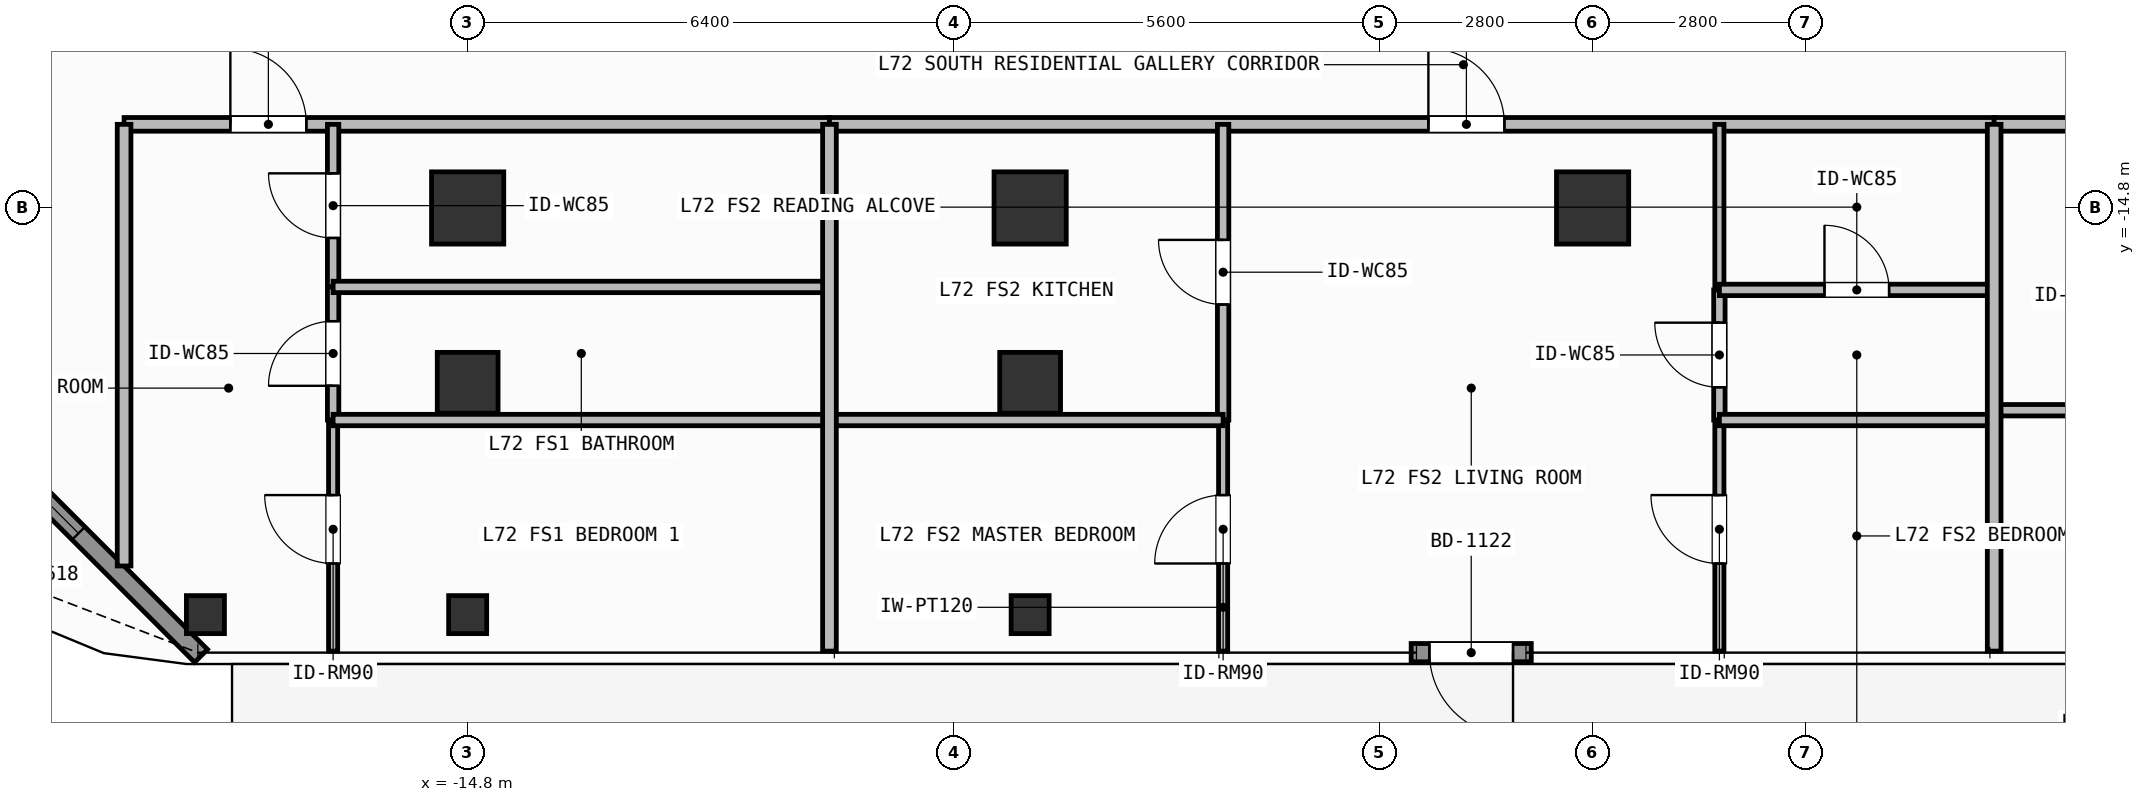
"""IFC4 building model, lengths in metres.
Left out: names, types, materials, properties, quantities, classifications, styles, units other than length and angle.
Written with IfcOpenShell. Run it as: python <this file> out.ifc"""

import sys

from ifc_helpers import new_model, si_unit, direction, frame, frame_2d, origin, origin_2d, place, context, subcontext, project, spatial, rectangle, hollow_rectangle, extrude, element, fill, save


model = new_model("IFC4")
c1 = context("Model", 3, precision=1e-05, world=origin(), true_north=direction((0.0, 1.0)))
c2 = subcontext(c1, "Body", "Model", "MODEL_VIEW")
j1 = project(units=[si_unit("LENGTHUNIT", "METRE"), si_unit("PLANEANGLEUNIT", "RADIAN")], contexts=[c1])
p1 = place(None, origin())
s1 = spatial("IfcSite", under=j1, at=p1, CompositionType="ELEMENT")
p2 = place(p1, origin())
s2 = spatial("IfcBuilding", under=s1, at=p2, CompositionType="ELEMENT")
p3 = place(p2, frame((0.0, 0.0, 293.7)))
s3 = spatial("IfcBuildingStorey", under=s2, at=p3, CompositionType="ELEMENT", Elevation=293.7)
for number, where, z_axis, x_axis in (
    (1, (-14.8, -14.8, 0.0), (0.0, 0.0, 1.0), (1.0, 0.0, 0.0)),
    (2, (-7.4, -14.8, 0.0), (0.0, 0.0, 1.0), (1.0, 0.0, 0.0)),
    (3, (0.0, -14.8, 0.0), (0.0, 0.0, 1.0), (1.0, 0.0, 0.0)),
):
    element("IfcColumn", number, at=place(p3, frame(where, z_axis=z_axis, x_axis=x_axis)), inside=s3, PredefinedType="COLUMN", context=c2, shape_type="SweptSolid", body=[
        extrude(rectangle(XDim=0.95, YDim=0.95, at=origin_2d()), origin(), (0.0, 0.0, 1.0), 3.9),
    ])
for number, where, z_axis, x_axis in (
    (4, (-14.8, -17.1, 0.0), (0.0, 0.0, 1.0), (1.0, 0.0, 0.0)),
    (5, (-7.4, -17.1, 0.0), (0.0, 0.0, 1.0), (1.0, 0.0, 0.0)),
):
    element("IfcColumn", number, at=place(p3, frame(where, z_axis=z_axis, x_axis=x_axis)), inside=s3, PredefinedType="COLUMN", context=c2, shape_type="SweptSolid", body=[
        extrude(hollow_rectangle(XDim=0.8, YDim=0.8, WallThickness=0.036, at=origin_2d()), origin(), (0.0, 0.0, 1.0), 3.9),
    ])
for number, where, z_axis, x_axis in (
    (6, (-18.25, -20.15, 0.0), (0.0, 0.0, 1.0), (1.0, 0.0, 0.0)),
    (7, (-14.8, -20.15, 0.0), (0.0, 0.0, 1.0), (1.0, 0.0, 0.0)),
    (8, (-7.4, -20.15, 0.0), (0.0, 0.0, 1.0), (1.0, 0.0, 0.0)),
):
    element("IfcColumn", number, at=place(p3, frame(where, z_axis=z_axis, x_axis=x_axis)), inside=s3, PredefinedType="COLUMN", context=c2, shape_type="SweptSolid", body=[
        extrude(hollow_rectangle(XDim=0.5, YDim=0.5, WallThickness=0.025, at=origin_2d()), origin(), (0.0, 0.0, 1.0), 3.9),
    ])
p4 = place(p3, frame((-0.807, -20.65, 0.0), z_axis=(0.0, 0.0, 1.0), x_axis=(-1.0, 0.0, 0.0)))
e9 = element("IfcWall", 9, at=p4, inside=s3, PredefinedType="SOLIDWALL", context=c2, shape_type="SweptSolid", body=[
    extrude(rectangle(XDim=1.58, YDim=0.24, at=frame_2d((0.79, 0.0))), origin(), (0.0, 0.0, 1.0), 3.68),
])
p5 = place(p4, frame((0.24, 0.0, 0.0)))
e10 = element("IfcOpeningElement", 10, at=p5, cuts=e9, PredefinedType="OPENING", context=c2, shape_type="SweptSolid", body=[
    extrude(rectangle(XDim=1.1, YDim=2.2, at=frame_2d((0.55, 1.1))), frame((0.0, 0.13, 0.0), z_axis=(0.0, -1.0, 0.0), x_axis=(1.0, 0.0, 0.0)), (0.0, 0.0, 1.0), 0.26),
])
p6 = place(p3, frame((-18.308, -20.692, 0.0), z_axis=(0.0, 0.0, 1.0), x_axis=(-0.707106781187, 0.707106781187, 0.0)))
e11 = element("IfcWall", 11, at=p6, inside=s3, PredefinedType="SOLIDWALL", context=c2, shape_type="SweptSolid", body=[
    extrude(rectangle(XDim=6.059, YDim=0.24, at=frame_2d((3.03, 0.0))), origin(), (0.0, 0.0, 1.0), 3.68),
])
p7 = place(p6, frame((2.28, 0.0, 0.8)))
e12 = element("IfcOpeningElement", 12, at=p7, cuts=e11, PredefinedType="OPENING", context=c2, shape_type="SweptSolid", body=[
    extrude(rectangle(XDim=1.5, YDim=1.85, at=frame_2d((0.75, 0.925))), frame((0.0, 0.13, 0.0), z_axis=(0.0, -1.0, 0.0), x_axis=(1.0, 0.0, 0.0)), (0.0, 0.0, 1.0), 0.26),
])
p8 = place(p3, frame((-19.32, -13.7, 0.0), z_axis=(0.0, 0.0, 1.0), x_axis=(1.0, 0.0, 0.0)))
e13 = element("IfcWall", 13, at=p8, inside=s3, PredefinedType="PARTITIONING", context=c2, shape_type="SweptSolid", body=[
    extrude(rectangle(XDim=9.28, YDim=0.18, at=frame_2d((4.64, 0.0))), origin(), (0.0, 0.0, 1.0), 3.68),
])
p9 = place(p8, frame((1.398, 0.0, 0.0)))
e14 = element("IfcOpeningElement", 14, at=p9, cuts=e13, PredefinedType="OPENING", context=c2, shape_type="SweptSolid", body=[
    extrude(rectangle(XDim=1.0, YDim=2.2, at=frame_2d((0.5, 1.1))), frame((0.0, 0.1, 0.0), z_axis=(0.0, -1.0, 0.0), x_axis=(1.0, 0.0, 0.0)), (0.0, 0.0, 1.0), 0.2),
])
p10 = place(p3, frame((-16.57, -15.839, 0.0), z_axis=(0.0, 0.0, 1.0), x_axis=(0.0, 1.0, 0.0)))
e15 = element("IfcWall", 15, at=p10, inside=s3, PredefinedType="PARTITIONING", context=c2, shape_type="SweptSolid", body=[
    extrude(rectangle(XDim=2.139, YDim=0.15, at=frame_2d((1.07, 0.0))), origin(), (0.0, 0.0, 1.0), 3.68),
])
p11 = place(p10, frame((0.645, 0.0, 0.0)))
e16 = element("IfcOpeningElement", 16, at=p11, cuts=e15, PredefinedType="OPENING", context=c2, shape_type="SweptSolid", body=[
    extrude(rectangle(XDim=0.85, YDim=2.1, at=frame_2d((0.425, 1.05))), frame((0.0, 0.085, 0.0), z_axis=(0.0, -1.0, 0.0), x_axis=(1.0, 0.0, 0.0)), (0.0, 0.0, 1.0), 0.17),
])
p12 = place(p3, frame((-16.57, -17.59, 0.0), z_axis=(0.0, 0.0, 1.0), x_axis=(0.0, 1.0, 0.0)))
e17 = element("IfcWall", 17, at=p12, inside=s3, PredefinedType="PARTITIONING", context=c2, shape_type="SweptSolid", body=[
    extrude(rectangle(XDim=1.751, YDim=0.15, at=frame_2d((0.875, 0.0))), origin(), (0.0, 0.0, 1.0), 3.68),
])
p13 = place(p12, frame((0.45, 0.0, 0.0)))
e18 = element("IfcOpeningElement", 18, at=p13, cuts=e17, PredefinedType="OPENING", context=c2, shape_type="SweptSolid", body=[
    extrude(rectangle(XDim=0.85, YDim=2.1, at=frame_2d((0.425, 1.05))), frame((0.0, 0.085, 0.0), z_axis=(0.0, -1.0, 0.0), x_axis=(1.0, 0.0, 0.0)), (0.0, 0.0, 1.0), 0.17),
])
p14 = place(p3, frame((-16.57, -20.63, 0.0), z_axis=(0.0, 0.0, 1.0), x_axis=(0.0, 1.0, 0.0)))
e19 = element("IfcWall", 19, at=p14, inside=s3, PredefinedType="PARTITIONING", context=c2, shape_type="SweptSolid", body=[
    extrude(rectangle(XDim=3.04, YDim=0.12, at=frame_2d((1.52, 0.0))), origin(), (0.0, 0.0, 1.0), 3.68),
])
p15 = place(p14, frame((1.153, 0.0, 0.0)))
e20 = element("IfcOpeningElement", 20, at=p15, cuts=e19, PredefinedType="OPENING", context=c2, shape_type="SweptSolid", body=[
    extrude(rectangle(XDim=0.9, YDim=2.1, at=frame_2d((0.45, 1.05))), frame((0.0, 0.07, 0.0), z_axis=(0.0, -1.0, 0.0), x_axis=(1.0, 0.0, 0.0)), (0.0, 0.0, 1.0), 0.14),
])
p16 = place(p3, frame((-10.04, -13.7, 0.0), z_axis=(0.0, 0.0, 1.0), x_axis=(1.0, 0.0, 0.0)))
e21 = element("IfcWall", 21, at=p16, inside=s3, PredefinedType="PARTITIONING", context=c2, shape_type="SweptSolid", body=[
    extrude(rectangle(XDim=15.323, YDim=0.18, at=frame_2d((7.662, 0.0))), origin(), (0.0, 0.0, 1.0), 3.68),
])
p17 = place(p16, frame((7.88, 0.0, 0.0)))
e22 = element("IfcOpeningElement", 22, at=p17, cuts=e21, PredefinedType="OPENING", context=c2, shape_type="SweptSolid", body=[
    extrude(rectangle(XDim=1.0, YDim=2.2, at=frame_2d((0.5, 1.1))), frame((0.0, 0.1, 0.0), z_axis=(0.0, -1.0, 0.0), x_axis=(1.0, 0.0, 0.0)), (0.0, 0.0, 1.0), 0.2),
])
p18 = place(p3, frame((-4.861, -17.59, 0.0), z_axis=(0.0, 0.0, 1.0), x_axis=(0.0, 1.0, 0.0)))
e23 = element("IfcWall", 23, at=p18, inside=s3, PredefinedType="PARTITIONING", context=c2, shape_type="SweptSolid", body=[
    extrude(rectangle(XDim=3.89, YDim=0.15, at=frame_2d((1.945, 0.0))), origin(), (0.0, 0.0, 1.0), 3.68),
])
p19 = place(p18, frame((1.52, 0.0, 0.0)))
e24 = element("IfcOpeningElement", 24, at=p19, cuts=e23, PredefinedType="OPENING", context=c2, shape_type="SweptSolid", body=[
    extrude(rectangle(XDim=0.85, YDim=2.1, at=frame_2d((0.425, 1.05))), frame((0.0, 0.085, 0.0), z_axis=(0.0, -1.0, 0.0), x_axis=(1.0, 0.0, 0.0)), (0.0, 0.0, 1.0), 0.17),
])
p20 = place(p3, frame((-4.861, -20.63, 0.0), z_axis=(0.0, 0.0, 1.0), x_axis=(0.0, 1.0, 0.0)))
e25 = element("IfcWall", 25, at=p20, inside=s3, PredefinedType="PARTITIONING", context=c2, shape_type="SweptSolid", body=[
    extrude(rectangle(XDim=3.04, YDim=0.12, at=frame_2d((1.52, 0.0))), origin(), (0.0, 0.0, 1.0), 3.68),
])
p21 = place(p20, frame((1.153, 0.0, 0.0)))
e26 = element("IfcOpeningElement", 26, at=p21, cuts=e25, PredefinedType="OPENING", context=c2, shape_type="SweptSolid", body=[
    extrude(rectangle(XDim=0.9, YDim=2.1, at=frame_2d((0.45, 1.05))), frame((0.0, 0.07, 0.0), z_axis=(0.0, -1.0, 0.0), x_axis=(1.0, 0.0, 0.0)), (0.0, 0.0, 1.0), 0.14),
])
p22 = place(p3, frame((1.668, -17.59, 0.0), z_axis=(0.0, 0.0, 1.0), x_axis=(0.0, 1.0, 0.0)))
e27 = element("IfcWall", 27, at=p22, inside=s3, PredefinedType="PARTITIONING", context=c2, shape_type="SweptSolid", body=[
    extrude(rectangle(XDim=1.712, YDim=0.15, at=frame_2d((0.856, 0.0))), origin(), (0.0, 0.0, 1.0), 3.68),
])
p23 = place(p22, frame((0.431, 0.0, 0.0)))
e28 = element("IfcOpeningElement", 28, at=p23, cuts=e27, PredefinedType="OPENING", context=c2, shape_type="SweptSolid", body=[
    extrude(rectangle(XDim=0.85, YDim=2.1, at=frame_2d((0.425, 1.05))), frame((0.0, 0.085, 0.0), z_axis=(0.0, -1.0, 0.0), x_axis=(1.0, 0.0, 0.0)), (0.0, 0.0, 1.0), 0.17),
])
p24 = place(p3, frame((1.668, -15.878, 0.0), z_axis=(0.0, 0.0, 1.0), x_axis=(0.0, 1.0, 0.0)))
e29 = element("IfcWall", 29, at=p24, inside=s3, PredefinedType="PARTITIONING", context=c2, shape_type="SweptSolid", body=[
    extrude(rectangle(XDim=2.178, YDim=0.12, at=frame_2d((1.089, 0.0))), origin(), (0.0, 0.0, 1.0), 3.68),
])
p25 = place(p3, frame((1.668, -20.63, 0.0), z_axis=(0.0, 0.0, 1.0), x_axis=(0.0, 1.0, 0.0)))
e30 = element("IfcWall", 30, at=p25, inside=s3, PredefinedType="PARTITIONING", context=c2, shape_type="SweptSolid", body=[
    extrude(rectangle(XDim=3.04, YDim=0.12, at=frame_2d((1.52, 0.0))), origin(), (0.0, 0.0, 1.0), 3.68),
])
p26 = place(p25, frame((1.153, 0.0, 0.0)))
e31 = element("IfcOpeningElement", 31, at=p26, cuts=e30, PredefinedType="OPENING", context=c2, shape_type="SweptSolid", body=[
    extrude(rectangle(XDim=0.9, YDim=2.1, at=frame_2d((0.45, 1.05))), frame((0.0, 0.07, 0.0), z_axis=(0.0, -1.0, 0.0), x_axis=(1.0, 0.0, 0.0)), (0.0, 0.0, 1.0), 0.14),
])
p27 = place(p3, frame((5.283, -13.7, 0.0), z_axis=(0.0, 0.0, 1.0), x_axis=(1.0, 0.0, 0.0)))
e32 = element("IfcWall", 32, at=p27, inside=s3, PredefinedType="PARTITIONING", context=c2, shape_type="SweptSolid", body=[
    extrude(rectangle(XDim=10.637, YDim=0.18, at=frame_2d((5.318, 0.0))), origin(), (0.0, 0.0, 1.0), 3.68),
])
p28 = place(p27, frame((4.998, 0.0, 0.0)))
e33 = element("IfcOpeningElement", 33, at=p28, cuts=e32, PredefinedType="OPENING", context=c2, shape_type="SweptSolid", body=[
    extrude(rectangle(XDim=1.0, YDim=2.2, at=frame_2d((0.5, 1.1))), frame((0.0, 0.1, 0.0), z_axis=(0.0, -1.0, 0.0), x_axis=(1.0, 0.0, 0.0)), (0.0, 0.0, 1.0), 0.2),
])
p29 = place(p3, frame((-19.32, -19.51, 0.0), z_axis=(0.0, 0.0, 1.0), x_axis=(0.0, 1.0, 0.0)))
e34 = element("IfcWall", 34, at=p29, inside=s3, PredefinedType="PARTITIONING", context=c2, shape_type="SweptSolid", body=[
    extrude(rectangle(XDim=5.81, YDim=0.18, at=frame_2d((2.905, 0.0))), origin(), (0.0, 0.0, 1.0), 3.68),
])
for number, where, z_axis, x_axis in (
    (35, (-16.57, -15.839, 0.0), (0.0, 0.0, 1.0), (1.0, 0.0, 0.0)),
    (36, (-16.57, -17.59, 0.0), (0.0, 0.0, 1.0), (1.0, 0.0, 0.0)),
):
    element("IfcWall", number, at=place(p3, frame(where, z_axis=z_axis, x_axis=x_axis)), inside=s3, PredefinedType="PARTITIONING", context=c2, shape_type="SweptSolid", body=[
        extrude(rectangle(XDim=6.53, YDim=0.15, at=frame_2d((3.265, 0.0))), origin(), (0.0, 0.0, 1.0), 3.68),
    ])
p30 = place(p3, frame((-10.04, -17.59, 0.0), z_axis=(0.0, 0.0, 1.0), x_axis=(1.0, 0.0, 0.0)))
e37 = element("IfcWall", 37, at=p30, inside=s3, PredefinedType="PARTITIONING", context=c2, shape_type="SweptSolid", body=[
    extrude(rectangle(XDim=5.179, YDim=0.15, at=frame_2d((2.589, 0.0))), origin(), (0.0, 0.0, 1.0), 3.68),
])
p31 = place(p3, frame((1.668, -15.878, 0.0), z_axis=(0.0, 0.0, 1.0), x_axis=(1.0, 0.0, 0.0)))
e38 = element("IfcWall", 38, at=p31, inside=s3, PredefinedType="PARTITIONING", context=c2, shape_type="SweptSolid", body=[
    extrude(rectangle(XDim=3.615, YDim=0.15, at=frame_2d((1.808, 0.0))), origin(), (0.0, 0.0, 1.0), 3.68),
])
p32 = place(p31, frame((1.383, 0.0, 0.0)))
e39 = element("IfcOpeningElement", 39, at=p32, cuts=e38, PredefinedType="OPENING", context=c2, shape_type="SweptSolid", body=[
    extrude(rectangle(XDim=0.85, YDim=2.1, at=frame_2d((0.425, 1.05))), frame((0.0, 0.085, 0.0), z_axis=(0.0, -1.0, 0.0), x_axis=(1.0, 0.0, 0.0)), (0.0, 0.0, 1.0), 0.17),
])
p33 = place(p3, frame((1.668, -17.59, 0.0), z_axis=(0.0, 0.0, 1.0), x_axis=(1.0, 0.0, 0.0)))
e40 = element("IfcWall", 40, at=p33, inside=s3, PredefinedType="PARTITIONING", context=c2, shape_type="SweptSolid", body=[
    extrude(rectangle(XDim=3.615, YDim=0.15, at=frame_2d((1.808, 0.0))), origin(), (0.0, 0.0, 1.0), 3.68),
])
p34 = place(p3, frame((-10.04, -20.63, 0.0), z_axis=(0.0, 0.0, 1.0), x_axis=(0.0, 1.0, 0.0)))
e41 = element("IfcWall", 41, at=p34, inside=s3, PredefinedType="PARTITIONING", context=c2, shape_type="SweptSolid", body=[
    extrude(rectangle(XDim=6.93, YDim=0.18, at=frame_2d((3.465, 0.0))), origin(), (0.0, 0.0, 1.0), 3.68),
])
p35 = place(p3, frame((5.283, -17.461, 0.0), z_axis=(0.0, 0.0, 1.0), x_axis=(1.0, 0.0, 0.0)))
e42 = element("IfcWall", 42, at=p35, inside=s3, PredefinedType="PARTITIONING", context=c2, shape_type="SweptSolid", body=[
    extrude(rectangle(XDim=4.06, YDim=0.15, at=frame_2d((2.03, 0.0))), origin(), (0.0, 0.0, 1.0), 3.68),
])
p36 = place(p3, frame((5.283, -20.63, 0.0), z_axis=(0.0, 0.0, 1.0), x_axis=(0.0, 1.0, 0.0)))
e43 = element("IfcWall", 43, at=p36, inside=s3, PredefinedType="PARTITIONING", context=c2, shape_type="SweptSolid", body=[
    extrude(rectangle(XDim=6.93, YDim=0.18, at=frame_2d((3.465, 0.0))), origin(), (0.0, 0.0, 1.0), 3.68),
])
p37 = place(p5, origin())
e44 = element("IfcDoor", 44, at=p37, inside=s3, OperationType="SINGLE_SWING_LEFT", PredefinedType="DOOR", context=c2, shape_type="SweptSolid", body=[
    extrude(rectangle(XDim=1.1, YDim=2.2, at=frame_2d((0.55, 1.1))), frame((0.0, 0.025, 0.0), z_axis=(0.0, -1.0, 0.0), x_axis=(1.0, 0.0, 0.0)), (0.0, 0.0, 1.0), 0.05),
])
fill(e10, e44)
p38 = place(p7, origin())
e45 = element("IfcWindow", 45, at=p38, inside=s3, PartitioningType="SINGLE_PANEL", PredefinedType="WINDOW", context=c2, shape_type="SweptSolid", body=[
    extrude(rectangle(XDim=1.5, YDim=1.85, at=frame_2d((0.75, 0.925))), frame((0.0, 0.03, 0.0), z_axis=(0.0, -1.0, 0.0), x_axis=(1.0, 0.0, 0.0)), (0.0, 0.0, 1.0), 0.06),
])
fill(e12, e45)
p39 = place(p9, origin())
e46 = element("IfcDoor", 46, at=p39, inside=s3, OperationType="SINGLE_SWING_LEFT", PredefinedType="DOOR", context=c2, shape_type="SweptSolid", body=[
    extrude(rectangle(XDim=1.0, YDim=2.2, at=frame_2d((0.5, 1.1))), frame((0.0, 0.025, 0.0), z_axis=(0.0, -1.0, 0.0), x_axis=(1.0, 0.0, 0.0)), (0.0, 0.0, 1.0), 0.05),
])
fill(e14, e46)
p40 = place(p11, origin())
e47 = element("IfcDoor", 47, at=p40, inside=s3, OperationType="SINGLE_SWING_RIGHT", PredefinedType="DOOR", context=c2, shape_type="SweptSolid", body=[
    extrude(rectangle(XDim=0.85, YDim=2.1, at=frame_2d((0.425, 1.05))), frame((0.0, 0.025, 0.0), z_axis=(0.0, -1.0, 0.0), x_axis=(1.0, 0.0, 0.0)), (0.0, 0.0, 1.0), 0.05),
])
fill(e16, e47)
p41 = place(p13, origin())
e48 = element("IfcDoor", 48, at=p41, inside=s3, OperationType="SINGLE_SWING_LEFT", PredefinedType="DOOR", context=c2, shape_type="SweptSolid", body=[
    extrude(rectangle(XDim=0.85, YDim=2.1, at=frame_2d((0.425, 1.05))), frame((0.0, 0.025, 0.0), z_axis=(0.0, -1.0, 0.0), x_axis=(1.0, 0.0, 0.0)), (0.0, 0.0, 1.0), 0.05),
])
fill(e18, e48)
p42 = place(p15, origin())
e49 = element("IfcDoor", 49, at=p42, inside=s3, OperationType="SINGLE_SWING_RIGHT", PredefinedType="DOOR", context=c2, shape_type="SweptSolid", body=[
    extrude(rectangle(XDim=0.9, YDim=2.1, at=frame_2d((0.45, 1.05))), frame((0.0, 0.025, 0.0), z_axis=(0.0, -1.0, 0.0), x_axis=(1.0, 0.0, 0.0)), (0.0, 0.0, 1.0), 0.05),
])
fill(e20, e49)
p43 = place(p17, origin())
e50 = element("IfcDoor", 50, at=p43, inside=s3, OperationType="SINGLE_SWING_LEFT", PredefinedType="DOOR", context=c2, shape_type="SweptSolid", body=[
    extrude(rectangle(XDim=1.0, YDim=2.2, at=frame_2d((0.5, 1.1))), frame((0.0, 0.025, 0.0), z_axis=(0.0, -1.0, 0.0), x_axis=(1.0, 0.0, 0.0)), (0.0, 0.0, 1.0), 0.05),
])
fill(e22, e50)
p44 = place(p19, origin())
e51 = element("IfcDoor", 51, at=p44, inside=s3, OperationType="SINGLE_SWING_RIGHT", PredefinedType="DOOR", context=c2, shape_type="SweptSolid", body=[
    extrude(rectangle(XDim=0.85, YDim=2.1, at=frame_2d((0.425, 1.05))), frame((0.0, 0.025, 0.0), z_axis=(0.0, -1.0, 0.0), x_axis=(1.0, 0.0, 0.0)), (0.0, 0.0, 1.0), 0.05),
])
fill(e24, e51)
p45 = place(p21, origin())
e52 = element("IfcDoor", 52, at=p45, inside=s3, OperationType="SINGLE_SWING_LEFT", PredefinedType="DOOR", context=c2, shape_type="SweptSolid", body=[
    extrude(rectangle(XDim=0.9, YDim=2.1, at=frame_2d((0.45, 1.05))), frame((0.0, 0.025, 0.0), z_axis=(0.0, -1.0, 0.0), x_axis=(1.0, 0.0, 0.0)), (0.0, 0.0, 1.0), 0.05),
])
fill(e26, e52)
p46 = place(p23, origin())
e53 = element("IfcDoor", 53, at=p46, inside=s3, OperationType="SINGLE_SWING_RIGHT", PredefinedType="DOOR", context=c2, shape_type="SweptSolid", body=[
    extrude(rectangle(XDim=0.85, YDim=2.1, at=frame_2d((0.425, 1.05))), frame((0.0, 0.025, 0.0), z_axis=(0.0, -1.0, 0.0), x_axis=(1.0, 0.0, 0.0)), (0.0, 0.0, 1.0), 0.05),
])
fill(e28, e53)
p47 = place(p32, origin())
e54 = element("IfcDoor", 54, at=p47, inside=s3, OperationType="SINGLE_SWING_LEFT", PredefinedType="DOOR", context=c2, shape_type="SweptSolid", body=[
    extrude(rectangle(XDim=0.85, YDim=2.1, at=frame_2d((0.425, 1.05))), frame((0.0, 0.025, 0.0), z_axis=(0.0, -1.0, 0.0), x_axis=(1.0, 0.0, 0.0)), (0.0, 0.0, 1.0), 0.05),
])
fill(e39, e54)
p48 = place(p26, origin())
e55 = element("IfcDoor", 55, at=p48, inside=s3, OperationType="SINGLE_SWING_RIGHT", PredefinedType="DOOR", context=c2, shape_type="SweptSolid", body=[
    extrude(rectangle(XDim=0.9, YDim=2.1, at=frame_2d((0.45, 1.05))), frame((0.0, 0.025, 0.0), z_axis=(0.0, -1.0, 0.0), x_axis=(1.0, 0.0, 0.0)), (0.0, 0.0, 1.0), 0.05),
])
fill(e31, e55)
save(model, sys.argv[1])
